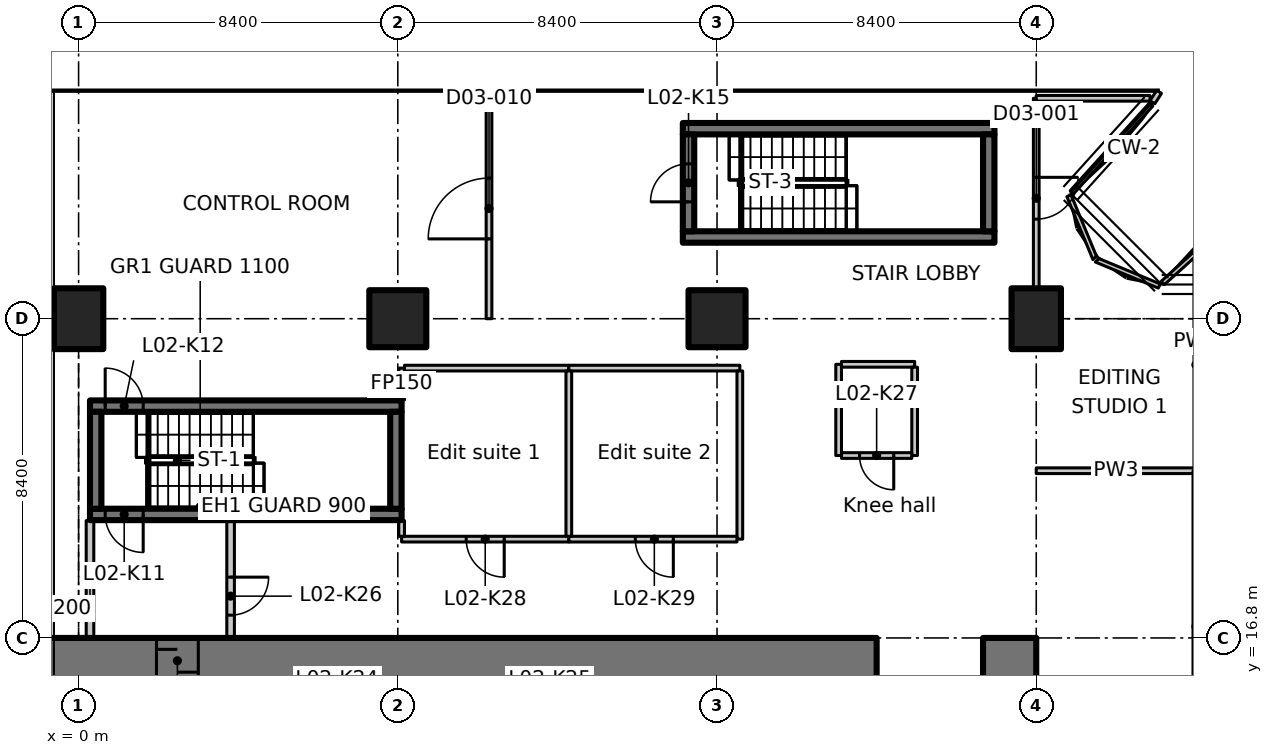
"""IFC4 building model, lengths in metres.
Left out: names, types, materials, properties, quantities, classifications, styles, units other than length and angle.
Written with IfcOpenShell. Run it as: python <this file> out.ifc"""

import sys

from ifc_helpers import new_model, si_unit, direction, frame, frame_2d, origin, origin_2d, place, context, subcontext, project, spatial, polyline, rectangle, outline, extrude, element, fill, save


model = new_model("IFC4")
c1 = context("Model", 3, precision=1e-05, world=origin(), true_north=direction((0.0, 1.0)))
c2 = subcontext(c1, "Body", "Model", "MODEL_VIEW")
j1 = project(units=[si_unit("LENGTHUNIT", "METRE"), si_unit("PLANEANGLEUNIT", "RADIAN")], contexts=[c1])
p1 = place(None, origin())
s1 = spatial("IfcSite", under=j1, at=p1, CompositionType="ELEMENT")
p2 = place(p1, origin())
s2 = spatial("IfcBuilding", under=s1, at=p2, CompositionType="ELEMENT")
p3 = place(p2, frame((0.0, 0.0, 12.5)))
s3 = spatial("IfcBuildingStorey", under=s2, at=p3, CompositionType="ELEMENT", Elevation=12.5)
p4 = place(p3, frame((0.0, 25.2, 0.0), z_axis=(0.0, 0.0, 1.0), x_axis=(1.0, 0.0, 0.0)))
e1 = element("IfcColumn", 1, at=p4, inside=s3, PredefinedType="COLUMN", context=c2, shape_type="SweptSolid", body=[
    extrude(rectangle(XDim=1.3, YDim=1.6, at=origin_2d()), origin(), (0.0, 0.0, 1.0), 7.25),
])
for number, where, z_axis, x_axis in (
    (2, (8.4, 25.2, 0.0), (0.0, 0.0, 1.0), (1.0, 0.0, 0.0)),
    (3, (16.8, 25.2, 0.0), (0.0, 0.0, 1.0), (1.0, 0.0, 0.0)),
):
    element("IfcColumn", number, at=place(p3, frame(where, z_axis=z_axis, x_axis=x_axis)), inside=s3, PredefinedType="COLUMN", context=c2, shape_type="SweptSolid", body=[
        extrude(rectangle(XDim=1.5, YDim=1.5, at=origin_2d()), origin(), (0.0, 0.0, 1.0), 7.25),
    ])
p5 = place(p3, frame((25.2, 25.2, 0.0), z_axis=(0.0, 0.0, 1.0), x_axis=(1.0, 0.0, 0.0)))
e4 = element("IfcColumn", 4, at=p5, inside=s3, PredefinedType="COLUMN", context=c2, shape_type="SweptSolid", body=[
    extrude(rectangle(XDim=1.3, YDim=1.6, at=origin_2d()), origin(), (0.0, 0.0, 1.0), 7.25),
])
p6 = place(p2, origin())
s4 = spatial("IfcBuildingStorey", under=s2, at=p6, CompositionType="ELEMENT", Elevation=0.0)
for number, where, z_axis, x_axis in (
    (5, (0.6, 32.4, -6.3), (0.0, 0.0, 1.0), (1.0, 0.0, 0.0)),
    (6, (9.0, 32.4, -6.3), (0.0, 0.0, 1.0), (1.0, 0.0, 0.0)),
):
    element("IfcWall", number, at=place(p6, frame(where, z_axis=z_axis, x_axis=x_axis)), inside=s4, PredefinedType="SOLIDWALL", context=c2, shape_type="SweptSolid", body=[
        extrude(rectangle(XDim=7.2, YDim=2.4, at=frame_2d((3.6, 0.0))), origin(), (0.0, 0.0, 1.0), 42.55),
    ])
p7 = place(p6, frame((17.4, 32.4, -6.3), z_axis=(0.0, 0.0, 1.0), x_axis=(1.0, 0.0, 0.0)))
e7 = element("IfcWall", 7, at=p7, inside=s4, PredefinedType="SOLIDWALL", context=c2, shape_type="SweptSolid", body=[
    extrude(rectangle(XDim=7.2, YDim=2.4, at=frame_2d((3.6, 0.0))), origin(), (0.0, 0.0, 1.0), 42.55),
])
p8 = place(p3, origin())
e8 = element("IfcWall", 8, at=p8, inside=s3, PredefinedType="SOLIDWALL", context=c2, shape_type="SweptSolid", body=[
    extrude(outline(polyline([(30.224, 27.59), (30.045, 27.59), (28.487, 26.182), (28.567, 26.093), (30.224, 27.59)])), origin(), (0.0, 0.0, 1.0), 7.5),
])
p9 = place(p3, origin())
e9 = element("IfcWall", 9, at=p9, inside=s3, PredefinedType="SOLIDWALL", context=c2, shape_type="SweptSolid", body=[
    extrude(outline(polyline([(28.412, 26.005), (28.458, 26.116), (26.847, 26.783), (26.755, 26.692), (28.412, 26.005)])), origin(), (0.0, 0.0, 1.0), 7.5),
])
p10 = place(p3, origin())
e10 = element("IfcWall", 10, at=p10, inside=s3, PredefinedType="SOLIDWALL", context=c2, shape_type="SweptSolid", body=[
    extrude(outline(polyline([(26.692, 26.755), (26.783, 26.847), (26.116, 28.458), (26.005, 28.412), (26.692, 26.755)])), origin(), (0.0, 0.0, 1.0), 7.5),
])
p11 = place(p3, origin())
e11 = element("IfcWall", 11, at=p11, inside=s3, PredefinedType="SOLIDWALL", context=c2, shape_type="SweptSolid", body=[
    extrude(outline(polyline([(26.093, 28.567), (26.182, 28.487), (28.267, 30.795), (28.167, 30.862), (26.093, 28.567)])), origin(), (0.0, 0.0, 1.0), 7.5),
])
p12 = place(p3, frame((-1.1, 16.2, 0.0), z_axis=(0.0, 0.0, 1.0), x_axis=(1.0, 0.0, 0.0)))
e12 = element("IfcWall", 12, at=p12, inside=s3, PredefinedType="SHEAR", context=c2, shape_type="SweptSolid", body=[
    extrude(rectangle(XDim=22.1, YDim=1.2, at=frame_2d((11.05, 0.0))), origin(), (0.0, 0.0, 1.0), 7.25),
])
p13 = place(p12, frame((3.15, 0.0, 0.0)))
e13 = element("IfcOpeningElement", 13, at=p13, cuts=e12, PredefinedType="OPENING", context=c2, shape_type="SweptSolid", body=[
    extrude(rectangle(XDim=1.1, YDim=2.3, at=frame_2d((0.55, 1.15))), frame((0.0, 0.61, 0.0), z_axis=(0.0, -1.0, 0.0), x_axis=(1.0, 0.0, 0.0)), (0.0, 0.0, 1.0), 1.22),
])
p14 = place(p3, frame((23.8, 16.2, 0.0), z_axis=(0.0, 0.0, 1.0), x_axis=(1.0, 0.0, 0.0)))
e14 = element("IfcWall", 14, at=p14, inside=s3, PredefinedType="SHEAR", context=c2, shape_type="SweptSolid", body=[
    extrude(rectangle(XDim=1.4, YDim=1.2, at=frame_2d((0.7, 0.0))), origin(), (0.0, 0.0, 1.0), 7.25),
])
p15 = place(p3, frame((8.5, 20.05, 0.0), z_axis=(0.0, 0.0, 1.0), x_axis=(-1.0, 0.0, 0.0)))
e15 = element("IfcWall", 15, at=p15, inside=s3, PredefinedType="SHEAR", context=c2, shape_type="SweptSolid", body=[
    extrude(rectangle(XDim=8.2, YDim=0.3, at=frame_2d((4.1, 0.0))), origin(), (0.0, 0.0, 1.0), 7.25),
])
p16 = place(p15, frame((6.8, 0.0, 0.0)))
e16 = element("IfcOpeningElement", 16, at=p16, cuts=e15, PredefinedType="OPENING", context=c2, shape_type="SweptSolid", body=[
    extrude(rectangle(XDim=1.0, YDim=2.1, at=frame_2d((0.5, 1.05))), frame((0.0, 0.16, 0.0), z_axis=(0.0, -1.0, 0.0), x_axis=(1.0, 0.0, 0.0)), (0.0, 0.0, 1.0), 0.32),
])
p17 = place(p3, frame((0.3, 22.9, 0.0), z_axis=(0.0, 0.0, 1.0), x_axis=(1.0, 0.0, 0.0)))
e17 = element("IfcWall", 17, at=p17, inside=s3, PredefinedType="SHEAR", context=c2, shape_type="SweptSolid", body=[
    extrude(rectangle(XDim=8.2, YDim=0.3, at=frame_2d((4.1, 0.0))), origin(), (0.0, 0.0, 1.0), 7.25),
])
p18 = place(p17, frame((0.4, 0.0, 0.0)))
e18 = element("IfcOpeningElement", 18, at=p18, cuts=e17, PredefinedType="OPENING", context=c2, shape_type="SweptSolid", body=[
    extrude(rectangle(XDim=1.0, YDim=2.1, at=frame_2d((0.5, 1.05))), frame((0.0, 0.16, 0.0), z_axis=(0.0, -1.0, 0.0), x_axis=(1.0, 0.0, 0.0)), (0.0, 0.0, 1.0), 0.32),
])
for number, where, z_axis, x_axis in (
    (19, (0.45, 20.2, 0.0), (0.0, 0.0, 1.0), (0.0, 1.0, 0.0)),
    (20, (8.35, 20.2, 0.0), (0.0, 0.0, 1.0), (0.0, 1.0, 0.0)),
):
    element("IfcWall", number, at=place(p3, frame(where, z_axis=z_axis, x_axis=x_axis)), inside=s3, PredefinedType="SHEAR", context=c2, shape_type="SweptSolid", body=[
        extrude(rectangle(XDim=2.55, YDim=0.3, at=frame_2d((1.275, 0.0))), origin(), (0.0, 0.0, 1.0), 7.25),
    ])
for number, where, z_axis, x_axis in (
    (21, (15.9, 27.35, 0.0), (0.0, 0.0, 1.0), (1.0, 0.0, 0.0)),
    (22, (15.9, 30.2, 0.0), (0.0, 0.0, 1.0), (1.0, 0.0, 0.0)),
):
    element("IfcWall", number, at=place(p3, frame(where, z_axis=z_axis, x_axis=x_axis)), inside=s3, PredefinedType="SHEAR", context=c2, shape_type="SweptSolid", body=[
        extrude(rectangle(XDim=8.2, YDim=0.3, at=frame_2d((4.1, 0.0))), origin(), (0.0, 0.0, 1.0), 7.25),
    ])
p19 = place(p3, frame((16.05, 27.5, 0.0), z_axis=(0.0, 0.0, 1.0), x_axis=(0.0, 1.0, 0.0)))
e23 = element("IfcWall", 23, at=p19, inside=s3, PredefinedType="SHEAR", context=c2, shape_type="SweptSolid", body=[
    extrude(rectangle(XDim=2.55, YDim=0.3, at=frame_2d((1.275, 0.0))), origin(), (0.0, 0.0, 1.0), 7.25),
])
p20 = place(p19, frame((0.775, 0.0, 0.0)))
e24 = element("IfcOpeningElement", 24, at=p20, cuts=e23, PredefinedType="OPENING", context=c2, shape_type="SweptSolid", body=[
    extrude(rectangle(XDim=1.0, YDim=2.1, at=frame_2d((0.5, 1.05))), frame((0.0, 0.16, 0.0), z_axis=(0.0, -1.0, 0.0), x_axis=(1.0, 0.0, 0.0)), (0.0, 0.0, 1.0), 0.32),
])
p21 = place(p3, frame((23.95, 27.5, 0.0), z_axis=(0.0, 0.0, 1.0), x_axis=(0.0, 1.0, 0.0)))
e25 = element("IfcWall", 25, at=p21, inside=s3, PredefinedType="SHEAR", context=c2, shape_type="SweptSolid", body=[
    extrude(rectangle(XDim=2.55, YDim=0.3, at=frame_2d((1.275, 0.0))), origin(), (0.0, 0.0, 1.0), 7.25),
])
p22 = place(p3, frame((0.3, 16.812, 0.0), z_axis=(0.0, 0.0, 1.0), x_axis=(0.0, 1.0, 0.0)))
e26 = element("IfcWall", 26, at=p22, inside=s3, PredefinedType="PARTITIONING", context=c2, shape_type="SweptSolid", body=[
    extrude(rectangle(XDim=3.076, YDim=0.2, at=frame_2d((1.538, 0.0))), origin(), (0.0, 0.0, 1.0), 6.88),
])
p23 = place(p3, frame((4.0, 19.888, 0.0), z_axis=(0.0, 0.0, 1.0), x_axis=(0.0, -1.0, 0.0)))
e27 = element("IfcWall", 27, at=p23, inside=s3, PredefinedType="PARTITIONING", context=c2, shape_type="SweptSolid", body=[
    extrude(rectangle(XDim=3.076, YDim=0.2, at=frame_2d((1.538, 0.0))), origin(), (0.0, 0.0, 1.0), 7.25),
])
p24 = place(p23, frame((1.488, 0.0, 0.0)))
e28 = element("IfcOpeningElement", 28, at=p24, cuts=e27, PredefinedType="OPENING", context=c2, shape_type="SweptSolid", body=[
    extrude(rectangle(XDim=1.0, YDim=2.1, at=frame_2d((0.5, 1.05))), frame((0.0, 0.11, 0.0), z_axis=(0.0, -1.0, 0.0), x_axis=(1.0, 0.0, 0.0)), (0.0, 0.0, 1.0), 0.22),
])
p25 = place(p3, frame((12.9, 19.4, 0.0), z_axis=(0.0, 0.0, 1.0), x_axis=(-1.0, 0.0, 0.0)))
e29 = element("IfcWall", 29, at=p25, inside=s3, PredefinedType="PARTITIONING", context=c2, shape_type="SweptSolid", body=[
    extrude(rectangle(XDim=4.4, YDim=0.15, at=frame_2d((2.2, 0.0))), origin(), (0.0, 0.0, 1.0), 7.25),
])
p26 = place(p25, frame((1.7, 0.0, 0.0)))
e30 = element("IfcOpeningElement", 30, at=p26, cuts=e29, PredefinedType="OPENING", context=c2, shape_type="SweptSolid", body=[
    extrude(rectangle(XDim=1.0, YDim=2.1, at=frame_2d((0.5, 1.05))), frame((0.0, 0.085, 0.0), z_axis=(0.0, -1.0, 0.0), x_axis=(1.0, 0.0, 0.0)), (0.0, 0.0, 1.0), 0.17),
])
p27 = place(p3, frame((8.5, 19.475, 0.0), z_axis=(0.0, 0.0, 1.0), x_axis=(0.0, 1.0, 0.0)))
e31 = element("IfcWall", 31, at=p27, inside=s3, PredefinedType="PARTITIONING", context=c2, shape_type="SweptSolid", body=[
    extrude(rectangle(XDim=0.413, YDim=0.15, at=frame_2d((0.207, 0.0))), origin(), (0.0, 0.0, 1.0), 7.25),
])
p28 = place(p3, frame((8.5, 23.062, 0.0), z_axis=(0.0, 0.0, 1.0), x_axis=(0.0, 1.0, 0.0)))
e32 = element("IfcWall", 32, at=p28, inside=s3, PredefinedType="PARTITIONING", context=c2, shape_type="SweptSolid", body=[
    extrude(rectangle(XDim=0.838, YDim=0.15, at=frame_2d((0.419, 0.0))), origin(), (0.0, 0.0, 1.0), 7.25),
])
p29 = place(p3, frame((8.575, 23.9, 0.0), z_axis=(0.0, 0.0, 1.0), x_axis=(1.0, 0.0, 0.0)))
e33 = element("IfcWall", 33, at=p29, inside=s3, PredefinedType="PARTITIONING", context=c2, shape_type="SweptSolid", body=[
    extrude(rectangle(XDim=4.325, YDim=0.15, at=frame_2d((2.163, 0.0))), origin(), (0.0, 0.0, 1.0), 7.25),
])
p30 = place(p3, frame((12.9, 23.9, 0.0), z_axis=(0.0, 0.0, 1.0), x_axis=(1.0, 0.0, 0.0)))
e34 = element("IfcWall", 34, at=p30, inside=s3, PredefinedType="PARTITIONING", context=c2, shape_type="SweptSolid", body=[
    extrude(rectangle(XDim=4.5, YDim=0.15, at=frame_2d((2.25, 0.0))), origin(), (0.0, 0.0, 1.0), 7.25),
])
p31 = place(p3, frame((17.4, 23.825, 0.0), z_axis=(0.0, 0.0, 1.0), x_axis=(0.0, -1.0, 0.0)))
e35 = element("IfcWall", 35, at=p31, inside=s3, PredefinedType="PARTITIONING", context=c2, shape_type="SweptSolid", body=[
    extrude(rectangle(XDim=4.425, YDim=0.15, at=frame_2d((2.212, 0.0))), origin(), (0.0, 0.0, 1.0), 7.25),
])
p32 = place(p3, frame((17.325, 19.4, 0.0), z_axis=(0.0, 0.0, 1.0), x_axis=(-1.0, 0.0, 0.0)))
e36 = element("IfcWall", 36, at=p32, inside=s3, PredefinedType="PARTITIONING", context=c2, shape_type="SweptSolid", body=[
    extrude(rectangle(XDim=4.425, YDim=0.15, at=frame_2d((2.212, 0.0))), origin(), (0.0, 0.0, 1.0), 7.25),
])
p33 = place(p32, frame((1.675, 0.0, 0.0)))
e37 = element("IfcOpeningElement", 37, at=p33, cuts=e36, PredefinedType="OPENING", context=c2, shape_type="SweptSolid", body=[
    extrude(rectangle(XDim=1.0, YDim=2.1, at=frame_2d((0.5, 1.05))), frame((0.0, 0.085, 0.0), z_axis=(0.0, -1.0, 0.0), x_axis=(1.0, 0.0, 0.0)), (0.0, 0.0, 1.0), 0.17),
])
p34 = place(p3, frame((12.9, 23.825, 0.0), z_axis=(0.0, 0.0, 1.0), x_axis=(0.0, -1.0, 0.0)))
e38 = element("IfcWall", 38, at=p34, inside=s3, PredefinedType="PARTITIONING", context=c2, shape_type="SweptSolid", body=[
    extrude(rectangle(XDim=4.35, YDim=0.15, at=frame_2d((2.175, 0.0))), origin(), (0.0, 0.0, 1.0), 7.25),
])
p35 = place(p3, frame((20.0, 21.6, 0.0), z_axis=(0.0, 0.0, 1.0), x_axis=(0.0, 1.0, 0.0)))
e39 = element("IfcWall", 39, at=p35, inside=s3, PredefinedType="PARTITIONING", context=c2, shape_type="SweptSolid", body=[
    extrude(rectangle(XDim=2.4, YDim=0.15, at=frame_2d((1.2, 0.0))), origin(), (0.0, 0.0, 1.0), 7.25),
])
p36 = place(p3, frame((20.075, 24.0, 0.0), z_axis=(0.0, 0.0, 1.0), x_axis=(1.0, 0.0, 0.0)))
e40 = element("IfcWall", 40, at=p36, inside=s3, PredefinedType="PARTITIONING", context=c2, shape_type="SweptSolid", body=[
    extrude(rectangle(XDim=1.925, YDim=0.15, at=frame_2d((0.962, 0.0))), origin(), (0.0, 0.0, 1.0), 7.25),
])
p37 = place(p3, frame((22.0, 23.925, 0.0), z_axis=(0.0, 0.0, 1.0), x_axis=(0.0, -1.0, 0.0)))
e41 = element("IfcWall", 41, at=p37, inside=s3, PredefinedType="PARTITIONING", context=c2, shape_type="SweptSolid", body=[
    extrude(rectangle(XDim=2.325, YDim=0.15, at=frame_2d((1.163, 0.0))), origin(), (0.0, 0.0, 1.0), 7.25),
])
p38 = place(p3, frame((21.925, 21.6, 0.0), z_axis=(0.0, 0.0, 1.0), x_axis=(-1.0, 0.0, 0.0)))
e42 = element("IfcWall", 42, at=p38, inside=s3, PredefinedType="PARTITIONING", context=c2, shape_type="SweptSolid", body=[
    extrude(rectangle(XDim=1.85, YDim=0.15, at=frame_2d((0.925, 0.0))), origin(), (0.0, 0.0, 1.0), 7.25),
])
p39 = place(p38, frame((0.475, 0.0, 0.0)))
e43 = element("IfcOpeningElement", 43, at=p39, cuts=e42, PredefinedType="OPENING", context=c2, shape_type="SweptSolid", body=[
    extrude(rectangle(XDim=0.9, YDim=2.1, at=frame_2d((0.45, 1.05))), frame((0.0, 0.085, 0.0), z_axis=(0.0, -1.0, 0.0), x_axis=(1.0, 0.0, 0.0)), (0.0, 0.0, 1.0), 0.17),
])
p40 = place(p3, frame((25.2, 21.2, 0.0), z_axis=(0.0, 0.0, 1.0), x_axis=(1.0, 0.0, 0.0)))
e44 = element("IfcWall", 44, at=p40, inside=s3, PredefinedType="PARTITIONING", context=c2, shape_type="SweptSolid", body=[
    extrude(rectangle(XDim=4.2, YDim=0.15, at=frame_2d((2.1, 0.0))), origin(), (0.0, 0.0, 1.0), 7.23),
])
p41 = place(p3, frame((25.2, 31.0, 0.0), z_axis=(0.0, 0.0, 1.0), x_axis=(0.0, -1.0, 0.0)))
e45 = element("IfcWall", 45, at=p41, inside=s3, PredefinedType="PARTITIONING", context=c2, shape_type="SweptSolid", body=[
    extrude(rectangle(XDim=4.98, YDim=0.15, at=frame_2d((2.49, 0.0))), origin(), (0.0, 0.0, 1.0), 7.23),
])
p42 = place(p41, frame((2.08, 0.0, 0.0)))
e46 = element("IfcOpeningElement", 46, at=p42, cuts=e45, PredefinedType="OPENING", context=c2, shape_type="SweptSolid", body=[
    extrude(rectangle(XDim=1.1, YDim=2.1, at=frame_2d((0.55, 1.05))), frame((0.0, 0.085, 0.0), z_axis=(0.0, -1.0, 0.0), x_axis=(1.0, 0.0, 0.0)), (0.0, 0.0, 1.0), 0.17),
])
p43 = place(p3, frame((25.2, 31.0, 0.0), z_axis=(0.0, 0.0, 1.0), x_axis=(1.0, 0.0, 0.0)))
e47 = element("IfcWall", 47, at=p43, inside=s3, PredefinedType="PARTITIONING", context=c2, shape_type="SweptSolid", body=[
    extrude(rectangle(XDim=2.994, YDim=0.15, at=frame_2d((1.497, 0.0))), origin(), (0.0, 0.0, 1.0), 7.23),
])
p44 = place(p3, frame((28.432, 31.168, 0.0), z_axis=(0.0, 0.0, 1.0), x_axis=(-0.541288698077, -0.840836812547, 0.0)))
e48 = element("IfcWall", 48, at=p44, inside=s3, PredefinedType="PARTITIONING", context=c2, shape_type="SweptSolid", body=[
    extrude(rectangle(XDim=0.325, YDim=0.15, at=frame_2d((0.163, 0.0))), origin(), (0.0, 0.0, 1.0), 7.23),
])
p45 = place(p3, frame((10.8, 25.2, 0.0), z_axis=(0.0, 0.0, 1.0), x_axis=(0.0, 1.0, 0.0)))
e49 = element("IfcWall", 49, at=p45, inside=s3, PredefinedType="PARTITIONING", context=c2, shape_type="SweptSolid", body=[
    extrude(rectangle(XDim=6.0, YDim=0.15, at=frame_2d((3.0, 0.0))), origin(), (0.0, 0.0, 1.0), 7.23),
])
p46 = place(p45, frame((2.1, 0.0, 0.0)))
e50 = element("IfcOpeningElement", 50, at=p46, cuts=e49, PredefinedType="OPENING", context=c2, shape_type="SweptSolid", body=[
    extrude(rectangle(XDim=1.6, YDim=2.1, at=frame_2d((0.8, 1.05))), frame((0.0, 0.085, 0.0), z_axis=(0.0, -1.0, 0.0), x_axis=(1.0, 0.0, 0.0)), (0.0, 0.0, 1.0), 0.17),
])
p47 = place(p13, origin())
e51 = element("IfcDoor", 51, at=p47, inside=s3, OperationType="SLIDING_TO_LEFT", PredefinedType="DOOR", context=c2, shape_type="SweptSolid", body=[
    extrude(rectangle(XDim=1.1, YDim=2.3, at=frame_2d((0.55, 1.15))), frame((0.0, 0.025, 0.0), z_axis=(0.0, -1.0, 0.0), x_axis=(1.0, 0.0, 0.0)), (0.0, 0.0, 1.0), 0.05),
])
fill(e13, e51)
p48 = place(p16, origin())
e52 = element("IfcDoor", 52, at=p48, inside=s3, OperationType="SINGLE_SWING_LEFT", PredefinedType="DOOR", context=c2, shape_type="SweptSolid", body=[
    extrude(rectangle(XDim=1.0, YDim=2.1, at=frame_2d((0.5, 1.05))), frame((0.0, 0.025, 0.0), z_axis=(0.0, -1.0, 0.0), x_axis=(1.0, 0.0, 0.0)), (0.0, 0.0, 1.0), 0.05),
])
fill(e16, e52)
p49 = place(p18, origin())
e53 = element("IfcDoor", 53, at=p49, inside=s3, OperationType="SINGLE_SWING_RIGHT", PredefinedType="DOOR", context=c2, shape_type="SweptSolid", body=[
    extrude(rectangle(XDim=1.0, YDim=2.1, at=frame_2d((0.5, 1.05))), frame((0.0, 0.025, 0.0), z_axis=(0.0, -1.0, 0.0), x_axis=(1.0, 0.0, 0.0)), (0.0, 0.0, 1.0), 0.05),
])
fill(e18, e53)
p50 = place(p20, origin())
e54 = element("IfcDoor", 54, at=p50, inside=s3, OperationType="SINGLE_SWING_LEFT", PredefinedType="DOOR", context=c2, shape_type="SweptSolid", body=[
    extrude(rectangle(XDim=1.0, YDim=2.1, at=frame_2d((0.5, 1.05))), frame((0.0, 0.025, 0.0), z_axis=(0.0, -1.0, 0.0), x_axis=(1.0, 0.0, 0.0)), (0.0, 0.0, 1.0), 0.05),
])
fill(e24, e54)
p51 = place(p24, origin())
e55 = element("IfcDoor", 55, at=p51, inside=s3, OperationType="SINGLE_SWING_RIGHT", PredefinedType="DOOR", context=c2, shape_type="SweptSolid", body=[
    extrude(rectangle(XDim=1.0, YDim=2.1, at=frame_2d((0.5, 1.05))), frame((0.0, 0.025, 0.0), z_axis=(0.0, -1.0, 0.0), x_axis=(1.0, 0.0, 0.0)), (0.0, 0.0, 1.0), 0.05),
])
fill(e28, e55)
p52 = place(p39, origin())
e56 = element("IfcDoor", 56, at=p52, inside=s3, OperationType="SINGLE_SWING_LEFT", PredefinedType="DOOR", context=c2, shape_type="SweptSolid", body=[
    extrude(rectangle(XDim=0.9, YDim=2.1, at=frame_2d((0.45, 1.05))), frame((0.0, 0.025, 0.0), z_axis=(0.0, -1.0, 0.0), x_axis=(1.0, 0.0, 0.0)), (0.0, 0.0, 1.0), 0.05),
])
fill(e43, e56)
p53 = place(p26, origin())
e57 = element("IfcDoor", 57, at=p53, inside=s3, OperationType="SINGLE_SWING_RIGHT", PredefinedType="DOOR", context=c2, shape_type="SweptSolid", body=[
    extrude(rectangle(XDim=1.0, YDim=2.1, at=frame_2d((0.5, 1.05))), frame((0.0, 0.025, 0.0), z_axis=(0.0, -1.0, 0.0), x_axis=(1.0, 0.0, 0.0)), (0.0, 0.0, 1.0), 0.05),
])
fill(e30, e57)
p54 = place(p33, origin())
e58 = element("IfcDoor", 58, at=p54, inside=s3, OperationType="SINGLE_SWING_LEFT", PredefinedType="DOOR", context=c2, shape_type="SweptSolid", body=[
    extrude(rectangle(XDim=1.0, YDim=2.1, at=frame_2d((0.5, 1.05))), frame((0.0, 0.025, 0.0), z_axis=(0.0, -1.0, 0.0), x_axis=(1.0, 0.0, 0.0)), (0.0, 0.0, 1.0), 0.05),
])
fill(e37, e58)
p55 = place(p42, origin())
e59 = element("IfcDoor", 59, at=p55, inside=s3, OperationType="SINGLE_SWING_RIGHT", PredefinedType="DOOR", context=c2, shape_type="SweptSolid", body=[
    extrude(rectangle(XDim=1.1, YDim=2.1, at=frame_2d((0.55, 1.05))), frame((0.0, 0.025, 0.0), z_axis=(0.0, -1.0, 0.0), x_axis=(1.0, 0.0, 0.0)), (0.0, 0.0, 1.0), 0.05),
])
fill(e46, e59)
p56 = place(p46, origin())
e60 = element("IfcDoor", 60, at=p56, inside=s3, OperationType="DOUBLE_DOOR_SINGLE_SWING", PredefinedType="DOOR", context=c2, shape_type="SweptSolid", body=[
    extrude(rectangle(XDim=1.6, YDim=2.1, at=frame_2d((0.8, 1.05))), frame((0.0, 0.025, 0.0), z_axis=(0.0, -1.0, 0.0), x_axis=(1.0, 0.0, 0.0)), (0.0, 0.0, 1.0), 0.05),
])
fill(e50, e60)
save(model, sys.argv[1])
